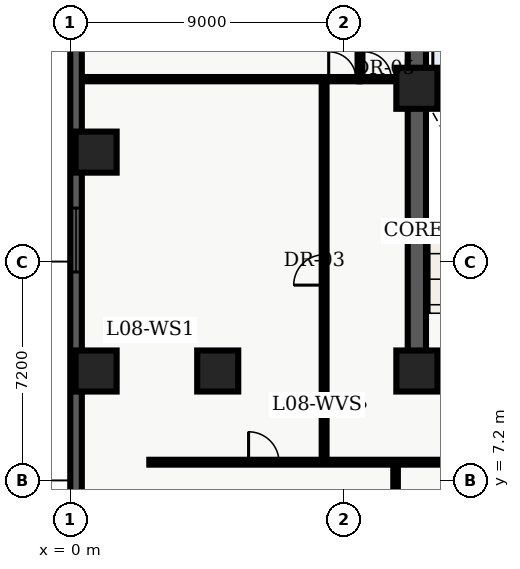
"""IFC4 building model, lengths in metres.
Left out: names, types, materials, properties, quantities, classifications, styles, units other than length and angle.
Written with IfcOpenShell. Run it as: python <this file> out.ifc"""

import sys

from ifc_helpers import new_model, entity, si_unit, converted_unit, direction, frame, origin_with_axes, origin_2d_with_axis, place, context, subcontext, project, spatial, polyline, rectangle, outline, extrude, element, fill, save


model = new_model("IFC4")
c1 = context("Model", 3, precision=1e-05, world=origin_with_axes(), true_north=direction((0.0, 1.0)))
c2 = subcontext(c1, "Body", "Model", "MODEL_VIEW")
j1 = project(units=[si_unit("LENGTHUNIT", "METRE"), converted_unit("PLANEANGLEUNIT", "DEGREE", entity("IfcPlaneAngleMeasure", 0.017), si_unit("PLANEANGLEUNIT", "RADIAN"), dimensions=[0, 0, 0, 0, 0, 0, 0])], contexts=[c1])
p1 = place(None, origin_with_axes())
s1 = spatial("IfcSite", under=j1, at=p1, CompositionType="ELEMENT")
p2 = place(p1, origin_with_axes())
s2 = spatial("IfcBuilding", under=s1, at=p2, CompositionType="ELEMENT")
p3 = place(p2, frame((0.0, 0.0, 36.6), z_axis=(0.0, 0.0, 1.0), x_axis=(1.0, 0.0, 0.0)))
s3 = spatial("IfcBuildingStorey", under=s2, at=p3, CompositionType="ELEMENT", Elevation=36.6)
p4 = place(p3, frame((11.4, 10.8, 0.0), z_axis=(0.0, 0.0, 1.0), x_axis=(0.0, 1.0, 0.0)))
e1 = element("IfcWall", 1, at=p4, inside=s3, PredefinedType="SHEAR", context=c2, shape_type="SweptSolid", body=[
    extrude(outline(polyline([(0.0, -0.3), (27.0, -0.3), (27.0, 0.3), (0.0, 0.3), (0.0, -0.3)])), origin_with_axes(), (0.0, 0.0, 1.0), 3.66),
])
p5 = place(p3, frame((11.4, 10.8, 0.0), z_axis=(0.0, 0.0, 1.0), x_axis=(1.0, 0.0, 0.0)))
e2 = element("IfcWall", 2, at=p5, inside=s3, PredefinedType="SHEAR", context=c2, shape_type="SweptSolid", body=[
    extrude(outline(polyline([(0.0, -0.3), (7.2, -0.3), (7.2, 0.3), (0.0, 0.3), (0.0, -0.3)])), origin_with_axes(), (0.0, 0.0, 1.0), 3.66),
])
p6 = place(p5, frame((2.625, 0.0, 0.0), z_axis=(0.0, 0.0, 1.0), x_axis=(1.0, 0.0, 0.0)))
e3 = element("IfcOpeningElement", 3, at=p6, cuts=e2, PredefinedType="OPENING", context=c2, shape_type="SweptSolid", body=[
    extrude(rectangle(XDim=1.05, YDim=0.62, at=origin_2d_with_axis()), origin_with_axes(), (0.0, 0.0, 1.0), 2.15),
])
p7 = place(p3, frame((11.7, 19.825, 0.0), z_axis=(0.0, 0.0, 1.0), x_axis=(1.0, 0.0, 0.0)))
e4 = element("IfcWall", 4, at=p7, inside=s3, PredefinedType="SHEAR", context=c2, shape_type="SweptSolid", body=[
    extrude(outline(polyline([(0.0, -0.125), (6.6, -0.125), (6.6, 0.125), (0.0, 0.125), (0.0, -0.125)])), origin_with_axes(), (0.0, 0.0, 1.0), 3.66),
])
for number, where, z_axis, x_axis in (
    (5, (11.4, 10.8, 0.0), (0.0, 0.0, 1.0), (1.0, 0.0, 0.0)),
    (6, (11.4, 20.1, 0.0), (0.0, 0.0, 1.0), (1.0, 0.0, 0.0)),
    (7, (4.85, 10.8, 0.0), (0.0, 0.0, 1.0), (1.0, 0.0, 0.0)),
    (8, (0.85, 10.8, 0.0), (0.0, 0.0, 1.0), (1.0, 0.0, 0.0)),
    (9, (0.85, 18.0, 0.0), (0.0, 0.0, 1.0), (1.0, 0.0, 0.0)),
):
    element("IfcColumn", number, at=place(p3, frame(where, z_axis=z_axis, x_axis=x_axis)), inside=s3, PredefinedType="COLUMN", context=c2, shape_type="SweptSolid", body=[
        extrude(rectangle(XDim=1.35, YDim=1.35, at=origin_2d_with_axis()), origin_with_axes(), (0.0, 0.0, 1.0), 3.9),
    ])
p8 = place(p3, frame((9.52, 20.4, 0.0), z_axis=(0.0, 0.0, 1.0), x_axis=(0.0, 1.0, 0.0)))
e10 = element("IfcWall", 10, at=p8, inside=s3, PredefinedType="PARTITIONING", context=c2, shape_type="SweptSolid", body=[
    extrude(outline(polyline([(0.0, -0.07), (4.0, -0.07), (4.0, 0.07), (0.0, 0.07), (0.0, -0.07)])), origin_with_axes(), (0.0, 0.0, 1.0), 2.7),
])
p9 = place(p3, frame((9.52, 20.4, 0.0), z_axis=(0.0, 0.0, 1.0), x_axis=(1.0, 0.0, 0.0)))
e11 = element("IfcWall", 11, at=p9, inside=s3, PredefinedType="PARTITIONING", context=c2, shape_type="SweptSolid", body=[
    extrude(outline(polyline([(0.0, -0.07), (1.58, -0.07), (1.58, 0.07), (0.0, 0.07), (0.0, -0.07)])), origin_with_axes(), (0.0, 0.0, 1.0), 2.7),
])
p10 = place(p9, frame((0.59, 0.0, 0.0), z_axis=(0.0, 0.0, 1.0), x_axis=(1.0, 0.0, 0.0)))
e12 = element("IfcOpeningElement", 12, at=p10, cuts=e11, PredefinedType="OPENING", context=c2, shape_type="SweptSolid", body=[
    extrude(rectangle(XDim=0.9, YDim=0.16, at=origin_2d_with_axis()), origin_with_axes(), (0.0, 0.0, 1.0), 2.15),
])
p11 = place(p3, frame((2.6, 7.8, 0.0), z_axis=(0.0, 0.0, 1.0), x_axis=(1.0, 0.0, 0.0)))
e13 = element("IfcWall", 13, at=p11, inside=s3, PredefinedType="PARTITIONING", context=c2, shape_type="SweptSolid", body=[
    extrude(outline(polyline([(0.0, -0.08), (18.55, -0.08), (18.55, 0.08), (0.0, 0.08), (0.0, -0.08)])), origin_with_axes(), (0.0, 0.0, 1.0), 2.7),
])
p12 = place(p11, frame((3.765, 0.0, 0.0), z_axis=(0.0, 0.0, 1.0), x_axis=(1.0, 0.0, 0.0)))
e14 = element("IfcOpeningElement", 14, at=p12, cuts=e13, PredefinedType="OPENING", context=c2, shape_type="SweptSolid", body=[
    extrude(rectangle(XDim=1.0, YDim=0.18, at=origin_2d_with_axis()), origin_with_axes(), (0.0, 0.0, 1.0), 2.15),
])
p13 = place(p11, frame((13.3, 0.0, 0.0), z_axis=(0.0, 0.0, 1.0), x_axis=(1.0, 0.0, 0.0)))
e15 = element("IfcOpeningElement", 15, at=p13, cuts=e13, PredefinedType="OPENING", context=c2, shape_type="SweptSolid", body=[
    extrude(rectangle(XDim=1.0, YDim=0.18, at=origin_2d_with_axis()), origin_with_axes(), (0.0, 0.0, 1.0), 2.15),
])
p14 = place(p3, frame((8.35, 7.8, 0.0), z_axis=(0.0, 0.0, 1.0), x_axis=(0.0, 1.0, 0.0)))
e16 = element("IfcWall", 16, at=p14, inside=s3, PredefinedType="PARTITIONING", context=c2, shape_type="SweptSolid", body=[
    extrude(outline(polyline([(0.0, -0.08), (12.6, -0.08), (12.6, 0.08), (0.0, 0.08), (0.0, -0.08)])), origin_with_axes(), (0.0, 0.0, 1.0), 2.7),
])
p15 = place(p14, frame((6.325, 0.0, 0.0), z_axis=(0.0, 0.0, 1.0), x_axis=(1.0, 0.0, 0.0)))
e17 = element("IfcOpeningElement", 17, at=p15, cuts=e16, PredefinedType="OPENING", context=c2, shape_type="SweptSolid", body=[
    extrude(rectangle(XDim=1.0, YDim=0.18, at=origin_2d_with_axis()), origin_with_axes(), (0.0, 0.0, 1.0), 2.15),
])
p16 = place(p3, frame((0.36, 20.4, 0.0), z_axis=(0.0, 0.0, 1.0), x_axis=(1.0, 0.0, 0.0)))
e18 = element("IfcWall", 18, at=p16, inside=s3, PredefinedType="PARTITIONING", context=c2, shape_type="SweptSolid", body=[
    extrude(outline(polyline([(0.0, -0.07), (9.16, -0.07), (9.16, 0.07), (0.0, 0.07), (0.0, -0.07)])), origin_with_axes(), (0.0, 0.0, 1.0), 2.7),
])
p17 = place(p16, frame((8.59, 0.0, 0.0), z_axis=(0.0, 0.0, 1.0), x_axis=(1.0, 0.0, 0.0)))
e19 = element("IfcOpeningElement", 19, at=p17, cuts=e18, PredefinedType="OPENING", context=c2, shape_type="SweptSolid", body=[
    extrude(rectangle(XDim=0.9, YDim=0.16, at=origin_2d_with_axis()), origin_with_axes(), (0.0, 0.0, 1.0), 2.15),
])
p18 = place(p3, frame((10.7, 0.36, 0.0), z_axis=(0.0, 0.0, 1.0), x_axis=(0.0, 1.0, 0.0)))
e20 = element("IfcWall", 20, at=p18, inside=s3, PredefinedType="PARTITIONING", context=c2, shape_type="SweptSolid", body=[
    extrude(outline(polyline([(0.0, -0.075), (7.34, -0.075), (7.34, 0.075), (0.0, 0.075), (0.0, -0.075)])), origin_with_axes(), (0.0, 0.0, 1.0), 2.7),
])
p19 = place(p3, frame((0.19, 2.78, 0.0), z_axis=(0.0, 0.0, 1.0), x_axis=(0.0, 1.0, 0.0)))
e21 = element("IfcWall", 21, at=p19, inside=s3, PredefinedType="SOLIDWALL", context=c2, shape_type="SweptSolid", body=[
    extrude(outline(polyline([(0.0, -0.19), (43.42, -0.19), (43.42, 0.19), (0.0, 0.19), (0.0, -0.19)])), origin_with_axes(), (0.0, 0.0, 1.0), 3.66),
])
p20 = place(p19, frame((2.946, 0.0, 0.45), z_axis=(0.0, 0.0, 1.0), x_axis=(1.0, 0.0, 0.0)))
e22 = element("IfcOpeningElement", 22, at=p20, cuts=e21, PredefinedType="OPENING", context=c2, shape_type="SweptSolid", body=[
    extrude(rectangle(XDim=2.1, YDim=0.4, at=origin_2d_with_axis()), origin_with_axes(), (0.0, 0.0, 1.0), 2.2),
])
p21 = place(p19, frame((12.328, 0.0, 0.45), z_axis=(0.0, 0.0, 1.0), x_axis=(1.0, 0.0, 0.0)))
e23 = element("IfcOpeningElement", 23, at=p21, cuts=e21, PredefinedType="OPENING", context=c2, shape_type="SweptSolid", body=[
    extrude(rectangle(XDim=2.1, YDim=0.4, at=origin_2d_with_axis()), origin_with_axes(), (0.0, 0.0, 1.0), 2.2),
])
p22 = place(p19, frame((26.401, 0.0, 0.45), z_axis=(0.0, 0.0, 1.0), x_axis=(1.0, 0.0, 0.0)))
e24 = element("IfcOpeningElement", 24, at=p22, cuts=e21, PredefinedType="OPENING", context=c2, shape_type="SweptSolid", body=[
    extrude(rectangle(XDim=2.1, YDim=0.4, at=origin_2d_with_axis()), origin_with_axes(), (0.0, 0.0, 1.0), 2.2),
])
p23 = place(p19, frame((31.092, 0.0, 0.45), z_axis=(0.0, 0.0, 1.0), x_axis=(1.0, 0.0, 0.0)))
e25 = element("IfcOpeningElement", 25, at=p23, cuts=e21, PredefinedType="OPENING", context=c2, shape_type="SweptSolid", body=[
    extrude(rectangle(XDim=2.1, YDim=0.4, at=origin_2d_with_axis()), origin_with_axes(), (0.0, 0.0, 1.0), 2.2),
])
p24 = place(p19, frame((40.024, 0.0, 0.45), z_axis=(0.0, 0.0, 1.0), x_axis=(1.0, 0.0, 0.0)))
e26 = element("IfcOpeningElement", 26, at=p24, cuts=e21, PredefinedType="OPENING", context=c2, shape_type="SweptSolid", body=[
    extrude(rectangle(XDim=2.1, YDim=0.4, at=origin_2d_with_axis()), origin_with_axes(), (0.0, 0.0, 1.0), 2.2),
])
p25 = place(p9, frame((0.59, 0.0, 0.0), z_axis=(0.0, 0.0, 1.0), x_axis=(1.0, 0.0, 0.0)))
e27 = element("IfcDoor", 27, at=p25, inside=s3, OperationType="SINGLE_SWING_LEFT", PredefinedType="DOOR", context=c2, shape_type="SweptSolid", body=[
    extrude(rectangle(XDim=0.9, YDim=0.084, at=origin_2d_with_axis()), origin_with_axes(), (0.0, 0.0, 1.0), 2.15),
])
fill(e12, e27)
p26 = place(p16, frame((8.59, 0.0, 0.0), z_axis=(0.0, 0.0, 1.0), x_axis=(1.0, 0.0, 0.0)))
e28 = element("IfcDoor", 28, at=p26, inside=s3, OperationType="SINGLE_SWING_LEFT", PredefinedType="DOOR", context=c2, shape_type="SweptSolid", body=[
    extrude(rectangle(XDim=0.9, YDim=0.084, at=origin_2d_with_axis()), origin_with_axes(), (0.0, 0.0, 1.0), 2.15),
])
fill(e19, e28)
p27 = place(p14, frame((6.325, 0.0, 0.0), z_axis=(0.0, 0.0, 1.0), x_axis=(1.0, 0.0, 0.0)))
e29 = element("IfcDoor", 29, at=p27, inside=s3, OperationType="SINGLE_SWING_LEFT", PredefinedType="DOOR", context=c2, shape_type="SweptSolid", body=[
    extrude(rectangle(XDim=1.0, YDim=0.09, at=origin_2d_with_axis()), origin_with_axes(), (0.0, 0.0, 1.0), 2.15),
])
fill(e17, e29)
p28 = place(p11, frame((3.765, 0.0, 0.0), z_axis=(0.0, 0.0, 1.0), x_axis=(1.0, 0.0, 0.0)))
e30 = element("IfcDoor", 30, at=p28, inside=s3, OperationType="SINGLE_SWING_LEFT", PredefinedType="DOOR", context=c2, shape_type="SweptSolid", body=[
    extrude(rectangle(XDim=1.0, YDim=0.09, at=origin_2d_with_axis()), origin_with_axes(), (0.0, 0.0, 1.0), 2.15),
])
fill(e14, e30)
p29 = place(p19, frame((12.328, 0.0, 0.45), z_axis=(0.0, 0.0, 1.0), x_axis=(1.0, 0.0, 0.0)))
e31 = element("IfcWindow", 31, at=p29, inside=s3, PredefinedType="WINDOW", context=c2, shape_type="SweptSolid", body=[
    extrude(rectangle(XDim=2.1, YDim=0.09, at=origin_2d_with_axis()), origin_with_axes(), (0.0, 0.0, 1.0), 2.2),
])
fill(e23, e31)
save(model, sys.argv[1])
